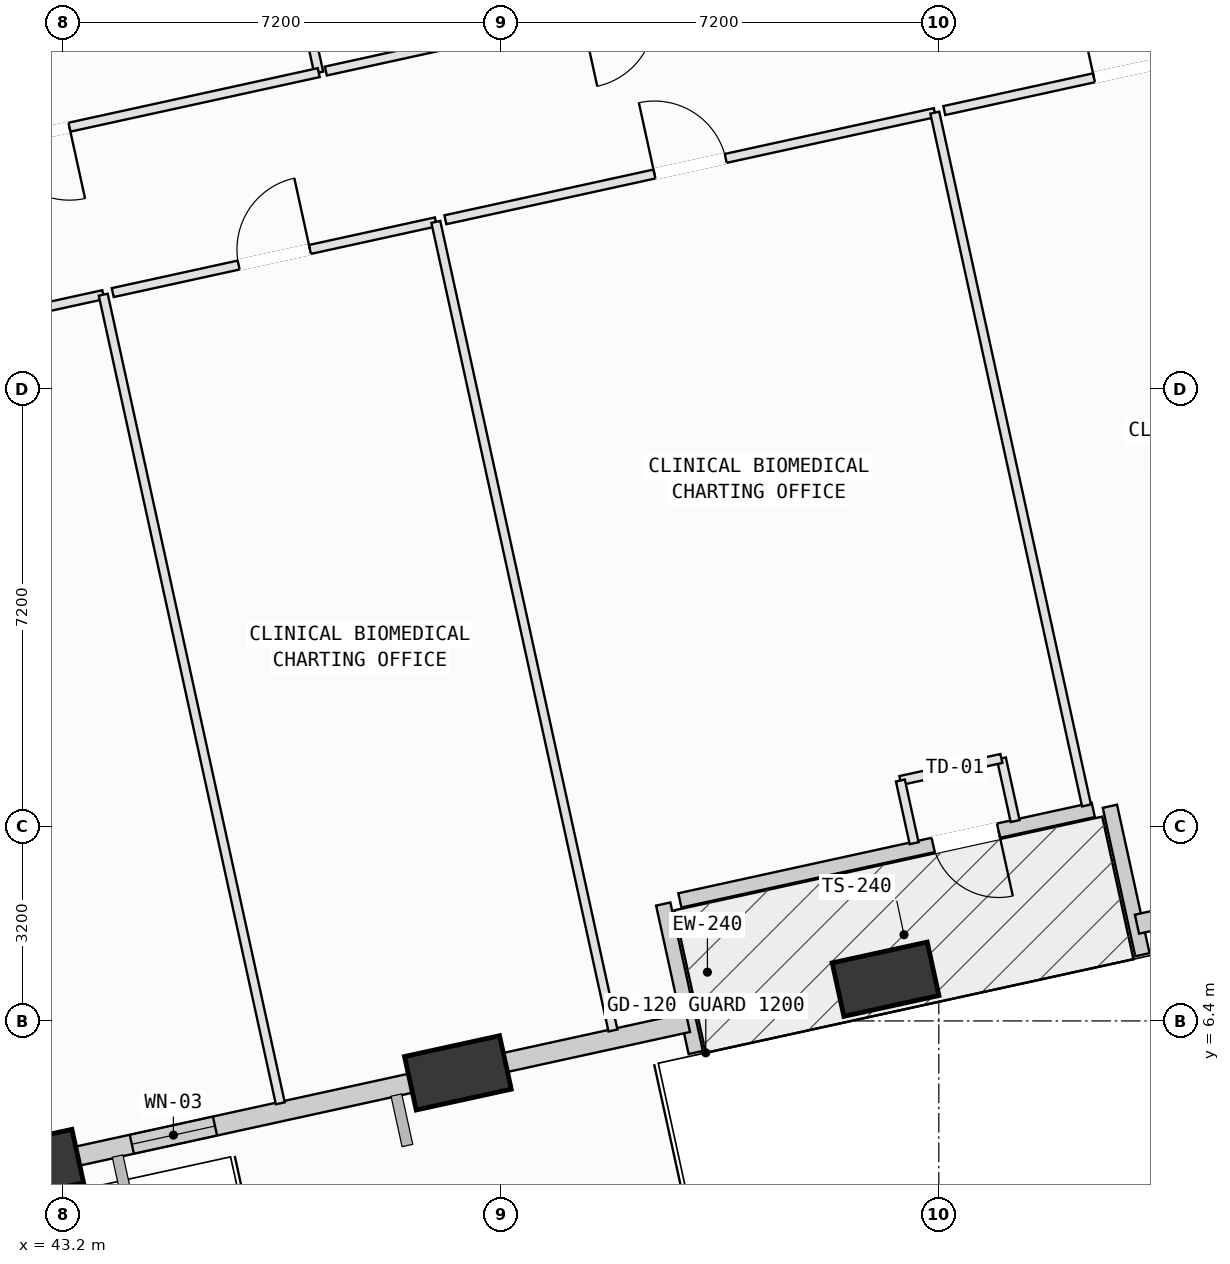
"""IFC4 building model, lengths in metres.
Left out: names, types, materials, properties, quantities, classifications, styles, units other than length and angle.
Written with IfcOpenShell. Run it as: python <this file> out.ifc"""

import sys

from ifc_helpers import new_model, si_unit, direction, frame, frame_2d, origin, origin_2d, place, context, subcontext, project, spatial, rectangle, extrude, element, fill, save


model = new_model("IFC4")
c1 = context("Model", 3, precision=1e-05, world=origin(), true_north=direction((0.0, 1.0)))
c2 = subcontext(c1, "Body", "Model", "MODEL_VIEW")
j1 = project(units=[si_unit("LENGTHUNIT", "METRE"), si_unit("PLANEANGLEUNIT", "RADIAN")], contexts=[c1])
p1 = place(None, origin())
s1 = spatial("IfcSite", under=j1, at=p1, CompositionType="ELEMENT")
p2 = place(p1, origin())
s2 = spatial("IfcBuilding", under=s1, at=p2, CompositionType="ELEMENT")
p3 = place(p2, frame((0.0, 0.0, 75.0)))
s3 = spatial("IfcBuildingStorey", under=s2, at=p3, CompositionType="ELEMENT", Elevation=75.0)
p4 = place(p3, frame((42.657, 4.006, 0.002), z_axis=(0.085511723194, 0.038072787141, 0.995609465642), x_axis=(-0.591862434469, 0.805790321678, 0.020020393494)))
e1 = element("IfcColumn", 1, at=p4, inside=s3, PredefinedType="COLUMN", context=c2, shape_type="SweptSolid", body=[
    extrude(rectangle(XDim=1.6, YDim=0.9, at=origin_2d()), origin(), (0.0, 0.0, 1.0), 4.014),
])
p5 = place(p3, frame((49.691, 5.546, 0.002), z_axis=(0.078805532139, 0.066957360383, 0.99463882892), x_axis=(-0.7946313064, 0.606689293141, 0.022117605581)))
e2 = element("IfcColumn", 2, at=p5, inside=s3, PredefinedType="COLUMN", context=c2, shape_type="SweptSolid", body=[
    extrude(rectangle(XDim=1.6, YDim=0.9, at=origin_2d()), origin(), (0.0, 0.0, 1.0), 4.018),
])
p6 = place(p3, frame((56.724, 7.086, 0.002), z_axis=(0.072109110685, 0.095761384165, 0.992789017596), x_axis=(-0.908089915306, 0.417989639233, 0.025639173424)))
e3 = element("IfcColumn", 3, at=p6, inside=s3, PredefinedType="COLUMN", context=c2, shape_type="SweptSolid", body=[
    extrude(rectangle(XDim=1.6, YDim=0.9, at=origin_2d()), origin(), (0.0, 0.0, 1.0), 4.026),
])
p7 = place(p3, frame((60.14, 9.871, 0.0), z_axis=(0.0, 0.0, 1.0), x_axis=(-0.976854226767, -0.213906100073, 0.0)))
e4 = element("IfcWall", 4, at=p7, inside=s3, PredefinedType="SOLIDWALL", context=c2, shape_type="SweptSolid", body=[
    extrude(rectangle(XDim=6.96, YDim=0.24, at=frame_2d((3.48, 0.0))), origin(), (0.0, 0.0, 1.0), 3.165),
])
p8 = place(p7, frame((1.596, 0.0, 0.0)))
e5 = element("IfcOpeningElement", 5, at=p8, cuts=e4, PredefinedType="OPENING", context=c2, shape_type="SweptSolid", body=[
    extrude(rectangle(XDim=1.1, YDim=2.15, at=frame_2d((0.55, 1.075))), frame((0.0, 0.13, 0.0), z_axis=(0.0, -1.0, 0.0), x_axis=(1.0, 0.0, 0.0)), (0.0, 0.0, 1.0), 0.26),
])
for number, where, z_axis, x_axis in (
    (6, (53.068, 8.323, 0.0), (0.0, 0.0, 1.0), (0.214, -0.977, 0.0)),
    (7, (60.948, 7.489, 0.0), (0.0, 0.0, 1.0), (-0.214, 0.977, 0.0)),
):
    element("IfcWall", number, at=place(p3, frame(where, z_axis=z_axis, x_axis=x_axis)), inside=s3, PredefinedType="SOLIDWALL", context=c2, shape_type="SweptSolid", body=[
        extrude(rectangle(XDim=2.5, YDim=0.24, at=frame_2d((1.25, 0.0))), origin(), (0.0, 0.0, 1.0), 3.165),
    ])
p9 = place(p3, frame((49.284, 5.457, 0.0), z_axis=(0.0, 0.0, 1.0), x_axis=(-0.976859069831, -0.213883981842, 0.0)))
e8 = element("IfcWall", 8, at=p9, inside=s3, PredefinedType="SOLIDWALL", context=c2, shape_type="SweptSolid", body=[
    extrude(rectangle(XDim=5.993, YDim=0.32, at=frame_2d((2.996, 0.0))), origin(), (0.0, 0.0, 1.0), 3.165),
])
p10 = place(p9, frame((3.673, 0.0, 0.75)))
e9 = element("IfcOpeningElement", 9, at=p10, cuts=e8, PredefinedType="OPENING", context=c2, shape_type="SweptSolid", body=[
    extrude(rectangle(XDim=1.4, YDim=1.85, at=frame_2d((0.7, 0.925))), frame((0.0, 0.17, 0.0), z_axis=(0.0, -1.0, 0.0), x_axis=(1.0, 0.0, 0.0)), (0.0, 0.0, 1.0), 0.34),
])
p11 = place(p3, frame((53.474, 6.374, 0.0), z_axis=(0.0, 0.0, 1.0), x_axis=(-0.97684998209, -0.213925483498, 0.0)))
e10 = element("IfcWall", 10, at=p11, inside=s3, PredefinedType="SOLIDWALL", context=c2, shape_type="SweptSolid", body=[
    extrude(rectangle(XDim=3.089, YDim=0.32, at=frame_2d((1.545, 0.0))), origin(), (0.0, 0.0, 1.0), 3.145),
])
p12 = place(p3, frame((63.381, 8.543, 0.0), z_axis=(0.0, 0.0, 1.0), x_axis=(-0.976858669403, -0.213885810685, 0.0)))
e11 = element("IfcWall", 11, at=p12, inside=s3, PredefinedType="SOLIDWALL", context=c2, shape_type="SweptSolid", body=[
    extrude(rectangle(XDim=2.582, YDim=0.32, at=frame_2d((1.291, 0.0))), origin(), (0.0, 0.0, 1.0), 3.145),
])
p13 = place(p3, frame((36.5, 16.734, 0.0), z_axis=(0.0, 0.0, 1.0), x_axis=(0.976857284262, 0.213892136799, 0.0)))
e12 = element("IfcWall", 12, at=p13, inside=s3, PredefinedType="PARTITIONING", context=c2, shape_type="SweptSolid", body=[
    extrude(rectangle(XDim=7.532, YDim=0.15, at=frame_2d((3.766, 0.0))), origin(), (0.0, 0.0, 1.0), 3.78),
])
p14 = place(p13, frame((3.166, 0.0, 0.0)))
e13 = element("IfcOpeningElement", 13, at=p14, cuts=e12, PredefinedType="OPENING", context=c2, shape_type="SweptSolid", body=[
    extrude(rectangle(XDim=1.2, YDim=2.15, at=frame_2d((0.6, 1.075))), frame((0.0, 0.085, 0.0), z_axis=(0.0, -1.0, 0.0), x_axis=(1.0, 0.0, 0.0)), (0.0, 0.0, 1.0), 0.17),
])
p15 = place(p3, frame((43.858, 18.345, 0.0), z_axis=(0.0, 0.0, 1.0), x_axis=(0.213887788309, -0.976858236395, 0.0)))
e14 = element("IfcWall", 14, at=p15, inside=s3, PredefinedType="PARTITIONING", context=c2, shape_type="SweptSolid", body=[
    extrude(rectangle(XDim=13.615, YDim=0.15, at=frame_2d((6.808, 0.0))), origin(), (0.0, 0.0, 1.0), 3.78),
])
p16 = place(p3, frame((43.479, 3.95, 0.0), z_axis=(0.0, 0.0, 1.0), x_axis=(-0.976970809845, -0.213372999021, 0.0)))
e15 = element("IfcWall", 15, at=p16, inside=s3, PredefinedType="PARTITIONING", context=c2, shape_type="SweptSolid", body=[
    extrude(rectangle(XDim=1.214, YDim=0.15, at=frame_2d((0.607, 0.0))), origin(), (0.0, 0.0, 1.0), 3.165),
])
p17 = place(p3, frame((44.014, 18.379, 0.0), z_axis=(0.0, 0.0, 1.0), x_axis=(0.976874830537, 0.213811986248, 0.0)))
e16 = element("IfcWall", 16, at=p17, inside=s3, PredefinedType="PARTITIONING", context=c2, shape_type="SweptSolid", body=[
    extrude(rectangle(XDim=5.44, YDim=0.15, at=frame_2d((2.72, 0.0))), origin(), (0.0, 0.0, 1.0), 3.78),
])
p18 = place(p17, frame((2.12, 0.0, 0.0)))
e17 = element("IfcOpeningElement", 17, at=p18, cuts=e16, PredefinedType="OPENING", context=c2, shape_type="SweptSolid", body=[
    extrude(rectangle(XDim=1.2, YDim=2.15, at=frame_2d((0.6, 1.075))), frame((0.0, 0.085, 0.0), z_axis=(0.0, -1.0, 0.0), x_axis=(1.0, 0.0, 0.0)), (0.0, 0.0, 1.0), 0.17),
])
p19 = place(p3, frame((49.328, 19.542, 0.0), z_axis=(0.0, 0.0, 1.0), x_axis=(0.213971223399, -0.976839964148, 0.0)))
e18 = element("IfcWall", 18, at=p19, inside=s3, PredefinedType="PARTITIONING", context=c2, shape_type="SweptSolid", body=[
    extrude(rectangle(XDim=13.615, YDim=0.15, at=frame_2d((6.807, 0.0))), origin(), (0.0, 0.0, 1.0), 3.78),
])
p20 = place(p3, frame((50.505, 5.489, 0.0), z_axis=(0.0, 0.0, 1.0), x_axis=(-0.976772398995, -0.214279445029, 0.0)))
e19 = element("IfcWall", 19, at=p20, inside=s3, PredefinedType="PARTITIONING", context=c2, shape_type="SweptSolid", body=[
    extrude(rectangle(XDim=1.2, YDim=0.15, at=frame_2d((0.6, 0.0))), origin(), (0.0, 0.0, 1.0), 3.165),
])
p21 = place(p3, frame((49.485, 19.577, 0.0), z_axis=(0.0, 0.0, 1.0), x_axis=(0.976861340805, 0.213873609498, 0.0)))
e20 = element("IfcWall", 20, at=p21, inside=s3, PredefinedType="PARTITIONING", context=c2, shape_type="SweptSolid", body=[
    extrude(rectangle(XDim=8.24, YDim=0.15, at=frame_2d((4.12, 0.0))), origin(), (0.0, 0.0, 1.0), 3.78),
])
p22 = place(p21, frame((3.52, 0.0, 0.0)))
e21 = element("IfcOpeningElement", 21, at=p22, cuts=e20, PredefinedType="OPENING", context=c2, shape_type="SweptSolid", body=[
    extrude(rectangle(XDim=1.2, YDim=2.15, at=frame_2d((0.6, 1.075))), frame((0.0, 0.085, 0.0), z_axis=(0.0, -1.0, 0.0), x_axis=(1.0, 0.0, 0.0)), (0.0, 0.0, 1.0), 0.17),
])
p23 = place(p3, frame((57.534, 21.339, 0.0), z_axis=(0.0, 0.0, 1.0), x_axis=(0.213897858368, -0.976856031453, 0.0)))
e22 = element("IfcWall", 22, at=p23, inside=s3, PredefinedType="PARTITIONING", context=c2, shape_type="SweptSolid", body=[
    extrude(rectangle(XDim=11.665, YDim=0.15, at=frame_2d((5.833, 0.0))), origin(), (0.0, 0.0, 1.0), 3.78),
])
p24 = place(p3, frame((58.855, 9.687, 0.0), z_axis=(0.0, 0.0, 1.0), x_axis=(-0.214380359452, 0.976750255429, 0.0)))
e23 = element("IfcWall", 23, at=p24, inside=s3, PredefinedType="PARTITIONING", context=c2, shape_type="SweptSolid", body=[
    extrude(rectangle(XDim=1.054, YDim=0.15, at=frame_2d((0.527, 0.0))), origin(), (0.0, 0.0, 1.0), 3.78),
])
p25 = place(p3, frame((58.629, 10.717, 0.0), z_axis=(0.0, 0.0, 1.0), x_axis=(-0.976934667461, -0.21353841695, 0.0)))
e24 = element("IfcWall", 24, at=p25, inside=s3, PredefinedType="PARTITIONING", context=c2, shape_type="SweptSolid", body=[
    extrude(rectangle(XDim=1.7, YDim=0.15, at=frame_2d((0.85, 0.0))), origin(), (0.0, 0.0, 1.0), 3.78),
])
p26 = place(p3, frame((56.968, 10.354, 0.0), z_axis=(0.0, 0.0, 1.0), x_axis=(0.21418661944, -0.976792757986, 0.0)))
e25 = element("IfcWall", 25, at=p26, inside=s3, PredefinedType="PARTITIONING", context=c2, shape_type="SweptSolid", body=[
    extrude(rectangle(XDim=1.055, YDim=0.15, at=frame_2d((0.528, 0.0))), origin(), (0.0, 0.0, 1.0), 3.78),
])
p27 = place(p3, frame((57.69, 21.373, 0.0), z_axis=(0.0, 0.0, 1.0), x_axis=(0.976850732773, 0.213922055621, 0.0)))
e26 = element("IfcWall", 26, at=p27, inside=s3, PredefinedType="PARTITIONING", context=c2, shape_type="SweptSolid", body=[
    extrude(rectangle(XDim=6.24, YDim=0.15, at=frame_2d((3.12, 0.0))), origin(), (0.0, 0.0, 1.0), 3.78),
])
p28 = place(p27, frame((2.52, 0.0, 0.0)))
e27 = element("IfcOpeningElement", 27, at=p28, cuts=e26, PredefinedType="OPENING", context=c2, shape_type="SweptSolid", body=[
    extrude(rectangle(XDim=1.2, YDim=2.15, at=frame_2d((0.6, 1.075))), frame((0.0, 0.085, 0.0), z_axis=(0.0, -1.0, 0.0), x_axis=(1.0, 0.0, 0.0)), (0.0, 0.0, 1.0), 0.17),
])
p29 = place(p3, frame((46.503, 26.105, 0.0), z_axis=(0.0, 0.0, 1.0), x_axis=(0.213825003403, -0.976871981336, 0.0)))
e28 = element("IfcWall", 28, at=p29, inside=s3, PredefinedType="PARTITIONING", context=c2, shape_type="SweptSolid", body=[
    extrude(rectangle(XDim=4.205, YDim=0.15, at=frame_2d((2.103, 0.0))), origin(), (0.0, 0.0, 1.0), 3.78),
])
p30 = place(p3, frame((47.402, 21.997, 0.0), z_axis=(0.0, 0.0, 1.0), x_axis=(-0.976859493343, -0.213882047555, 0.0)))
e29 = element("IfcWall", 29, at=p30, inside=s3, PredefinedType="PARTITIONING", context=c2, shape_type="SweptSolid", body=[
    extrude(rectangle(XDim=9.594, YDim=0.15, at=frame_2d((4.797, 0.0))), origin(), (0.0, 0.0, 1.0), 3.78),
])
p31 = place(p30, frame((4.197, 0.0, 0.0)))
e30 = element("IfcOpeningElement", 30, at=p31, cuts=e29, PredefinedType="OPENING", context=c2, shape_type="SweptSolid", body=[
    extrude(rectangle(XDim=1.2, YDim=2.15, at=frame_2d((0.6, 1.075))), frame((0.0, 0.085, 0.0), z_axis=(0.0, -1.0, 0.0), x_axis=(1.0, 0.0, 0.0)), (0.0, 0.0, 1.0), 0.17),
])
p32 = place(p3, frame((57.105, 24.122, 0.0), z_axis=(0.0, 0.0, 1.0), x_axis=(-0.976853250056, -0.213910560411, 0.0)))
e31 = element("IfcWall", 31, at=p32, inside=s3, PredefinedType="PARTITIONING", context=c2, shape_type="SweptSolid", body=[
    extrude(rectangle(XDim=9.813, YDim=0.15, at=frame_2d((4.906, 0.0))), origin(), (0.0, 0.0, 1.0), 3.78),
])
p33 = place(p32, frame((4.307, 0.0, 0.0)))
e32 = element("IfcOpeningElement", 32, at=p33, cuts=e31, PredefinedType="OPENING", context=c2, shape_type="SweptSolid", body=[
    extrude(rectangle(XDim=1.2, YDim=2.15, at=frame_2d((0.6, 1.075))), frame((0.0, 0.085, 0.0), z_axis=(0.0, -1.0, 0.0), x_axis=(1.0, 0.0, 0.0)), (0.0, 0.0, 1.0), 0.17),
])
p34 = place(p8, origin())
e33 = element("IfcDoor", 33, at=p34, inside=s3, OperationType="SINGLE_SWING_LEFT", PredefinedType="DOOR", context=c2, shape_type="SweptSolid", body=[
    extrude(rectangle(XDim=1.1, YDim=2.15, at=frame_2d((0.55, 1.075))), frame((0.0, 0.025, 0.0), z_axis=(0.0, -1.0, 0.0), x_axis=(1.0, 0.0, 0.0)), (0.0, 0.0, 1.0), 0.05),
])
fill(e5, e33)
p35 = place(p10, origin())
e34 = element("IfcWindow", 34, at=p35, inside=s3, PartitioningType="SINGLE_PANEL", PredefinedType="WINDOW", context=c2, shape_type="SweptSolid", body=[
    extrude(rectangle(XDim=1.4, YDim=1.85, at=frame_2d((0.7, 0.925))), frame((0.0, 0.03, 0.0), z_axis=(0.0, -1.0, 0.0), x_axis=(1.0, 0.0, 0.0)), (0.0, 0.0, 1.0), 0.06),
])
fill(e9, e34)
p36 = place(p18, origin())
e35 = element("IfcDoor", 35, at=p36, inside=s3, OperationType="SINGLE_SWING_RIGHT", PredefinedType="DOOR", context=c2, shape_type="SweptSolid", body=[
    extrude(rectangle(XDim=1.2, YDim=2.15, at=frame_2d((0.6, 1.075))), frame((0.0, 0.025, 0.0), z_axis=(0.0, -1.0, 0.0), x_axis=(1.0, 0.0, 0.0)), (0.0, 0.0, 1.0), 0.05),
])
fill(e17, e35)
p37 = place(p22, origin())
e36 = element("IfcDoor", 36, at=p37, inside=s3, OperationType="SINGLE_SWING_LEFT", PredefinedType="DOOR", context=c2, shape_type="SweptSolid", body=[
    extrude(rectangle(XDim=1.2, YDim=2.15, at=frame_2d((0.6, 1.075))), frame((0.0, 0.025, 0.0), z_axis=(0.0, -1.0, 0.0), x_axis=(1.0, 0.0, 0.0)), (0.0, 0.0, 1.0), 0.05),
])
fill(e21, e36)
p38 = place(p28, origin())
e37 = element("IfcDoor", 37, at=p38, inside=s3, OperationType="SINGLE_SWING_LEFT", PredefinedType="DOOR", context=c2, shape_type="SweptSolid", body=[
    extrude(rectangle(XDim=1.2, YDim=2.15, at=frame_2d((0.6, 1.075))), frame((0.0, 0.025, 0.0), z_axis=(0.0, -1.0, 0.0), x_axis=(1.0, 0.0, 0.0)), (0.0, 0.0, 1.0), 0.05),
])
fill(e27, e37)
p39 = place(p31, origin())
e38 = element("IfcDoor", 38, at=p39, inside=s3, OperationType="SINGLE_SWING_LEFT", PredefinedType="DOOR", context=c2, shape_type="SweptSolid", body=[
    extrude(rectangle(XDim=1.2, YDim=2.15, at=frame_2d((0.6, 1.075))), frame((0.0, 0.025, 0.0), z_axis=(0.0, -1.0, 0.0), x_axis=(1.0, 0.0, 0.0)), (0.0, 0.0, 1.0), 0.05),
])
fill(e30, e38)
save(model, sys.argv[1])
